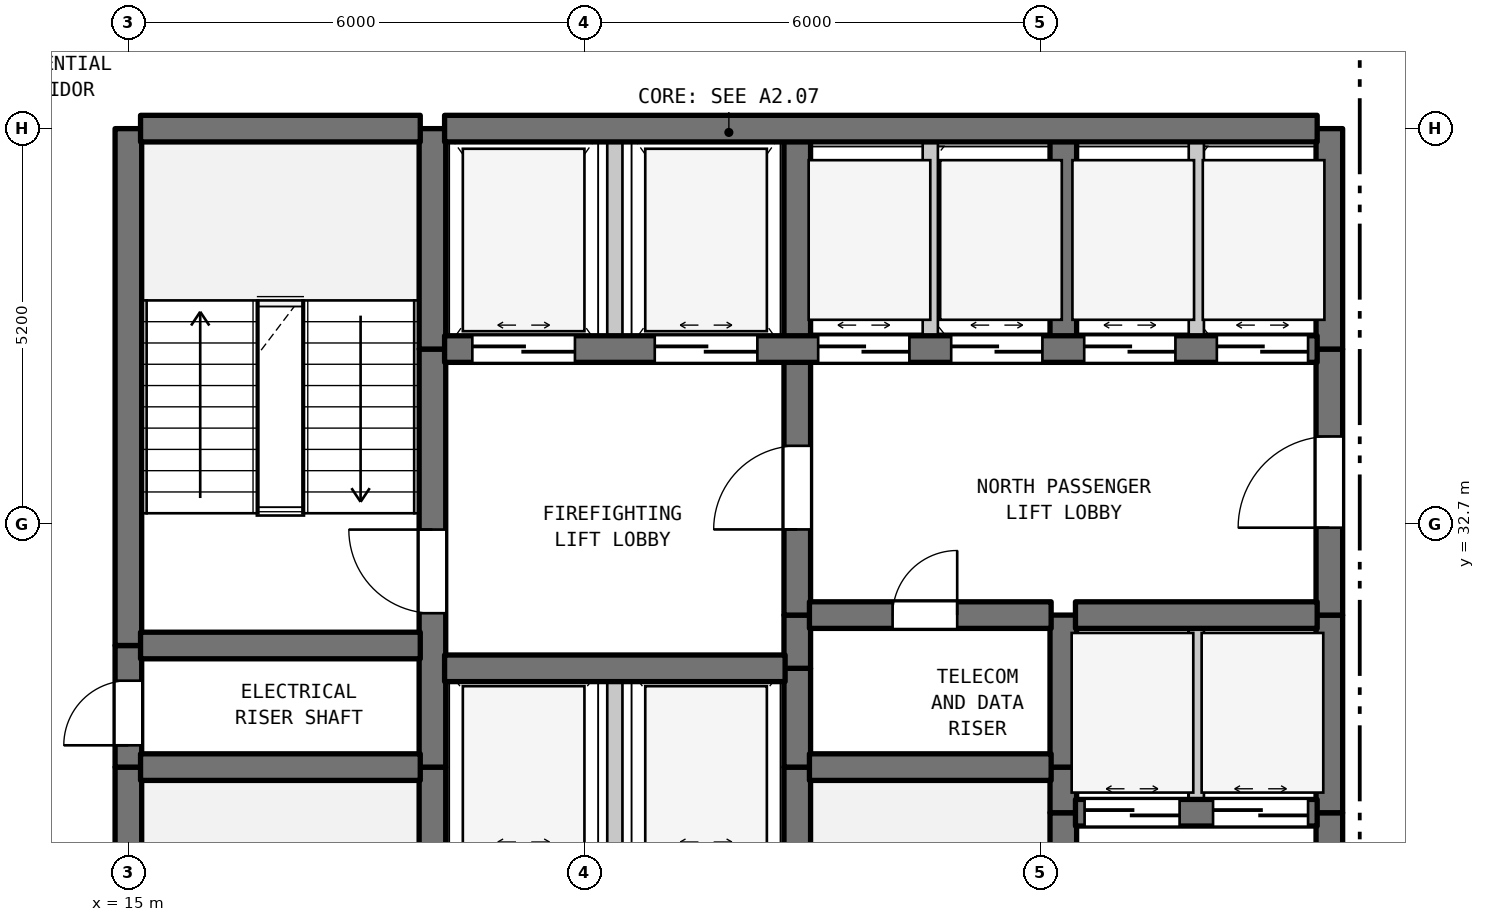
"""IFC4 building model, lengths in metres.
Left out: names, types, materials, properties, quantities, classifications, styles, units other than length and angle.
Written with IfcOpenShell. Run it as: python <this file> out.ifc"""

import sys

from ifc_helpers import new_model, si_unit, direction, frame, frame_2d, origin, place, context, subcontext, project, spatial, rectangle, extrude, element, fill, save


model = new_model("IFC4")
c1 = context("Model", 3, precision=1e-05, world=origin(), true_north=direction((0.0, 1.0)))
c2 = subcontext(c1, "Body", "Model", "MODEL_VIEW")
j1 = project(units=[si_unit("LENGTHUNIT", "METRE"), si_unit("PLANEANGLEUNIT", "RADIAN")], contexts=[c1])
p1 = place(None, origin())
s1 = spatial("IfcSite", under=j1, at=p1, CompositionType="ELEMENT")
p2 = place(p1, origin())
s2 = spatial("IfcBuilding", under=s1, at=p2, CompositionType="ELEMENT")
p3 = place(p2, frame((0.0, 0.0, 27.7)))
s3 = spatial("IfcBuildingStorey", under=s2, at=p3, CompositionType="ELEMENT", Elevation=27.7)
p4 = place(p3, frame((15.0, 22.7, 0.0), z_axis=(0.0, 0.0, 1.0), x_axis=(0.0, 1.0, 0.0)))
e1 = element("IfcWall", 1, at=p4, inside=s3, PredefinedType="SHEAR", context=c2, shape_type="SweptSolid", body=[
    extrude(rectangle(XDim=6.8, YDim=0.35, at=frame_2d((3.4, 0.0))), origin(), (0.0, 0.0, 1.0), 3.385),
])
p5 = place(p3, frame((15.0, 29.5, 0.0), z_axis=(0.0, 0.0, 1.0), x_axis=(0.0, 1.0, 0.0)))
e2 = element("IfcWall", 2, at=p5, inside=s3, PredefinedType="SHEAR", context=c2, shape_type="SweptSolid", body=[
    extrude(rectangle(XDim=1.6, YDim=0.35, at=frame_2d((0.8, 0.0))), origin(), (0.0, 0.0, 1.0), 3.385),
])
p6 = place(p5, frame((0.287, 0.0, 0.0)))
e3 = element("IfcOpeningElement", 3, at=p6, cuts=e2, PredefinedType="OPENING", context=c2, shape_type="SweptSolid", body=[
    extrude(rectangle(XDim=0.85, YDim=2.1, at=frame_2d((0.425, 1.05))), frame((0.0, 0.185, 0.0), z_axis=(0.0, -1.0, 0.0), x_axis=(1.0, 0.0, 0.0)), (0.0, 0.0, 1.0), 0.37),
])
p7 = place(p3, frame((15.0, 31.1, 0.0), z_axis=(0.0, 0.0, 1.0), x_axis=(0.0, 1.0, 0.0)))
e4 = element("IfcWall", 4, at=p7, inside=s3, PredefinedType="SHEAR", context=c2, shape_type="SweptSolid", body=[
    extrude(rectangle(XDim=6.8, YDim=0.35, at=frame_2d((3.4, 0.0))), origin(), (0.0, 0.0, 1.0), 3.385),
])
p8 = place(p3, frame((19.0, 28.2, 0.0), z_axis=(0.0, 0.0, 1.0), x_axis=(0.0, 1.0, 0.0)))
e5 = element("IfcWall", 5, at=p8, inside=s3, PredefinedType="SHEAR", context=c2, shape_type="SweptSolid", body=[
    extrude(rectangle(XDim=1.3, YDim=0.35, at=frame_2d((0.65, 0.0))), origin(), (0.0, 0.0, 1.0), 3.385),
])
p9 = place(p3, frame((19.0, 29.5, 0.0), z_axis=(0.0, 0.0, 1.0), x_axis=(0.0, 1.0, 0.0)))
e6 = element("IfcWall", 6, at=p9, inside=s3, PredefinedType="SHEAR", context=c2, shape_type="SweptSolid", body=[
    extrude(rectangle(XDim=5.5, YDim=0.35, at=frame_2d((2.75, 0.0))), origin(), (0.0, 0.0, 1.0), 3.385),
])
p10 = place(p9, frame((2.025, 0.0, 0.0)))
e7 = element("IfcOpeningElement", 7, at=p10, cuts=e6, PredefinedType="OPENING", context=c2, shape_type="SweptSolid", body=[
    extrude(rectangle(XDim=1.1, YDim=2.15, at=frame_2d((0.55, 1.075))), frame((0.0, 0.185, 0.0), z_axis=(0.0, -1.0, 0.0), x_axis=(1.0, 0.0, 0.0)), (0.0, 0.0, 1.0), 0.37),
])
p11 = place(p3, frame((19.0, 35.0, 0.0), z_axis=(0.0, 0.0, 1.0), x_axis=(0.0, 1.0, 0.0)))
e8 = element("IfcWall", 8, at=p11, inside=s3, PredefinedType="SHEAR", context=c2, shape_type="SweptSolid", body=[
    extrude(rectangle(XDim=2.9, YDim=0.35, at=frame_2d((1.45, 0.0))), origin(), (0.0, 0.0, 1.0), 3.385),
])
p12 = place(p3, frame((21.4, 28.2, 0.0), z_axis=(0.0, 0.0, 1.0), x_axis=(0.0, 1.0, 0.0)))
e9 = element("IfcWall", 9, at=p12, inside=s3, PredefinedType="STANDARD", context=c2, shape_type="SweptSolid", body=[
    extrude(rectangle(XDim=2.6, YDim=0.2, at=frame_2d((1.3, 0.0))), origin(), (0.0, 0.0, 1.0), 3.385),
])
p13 = place(p3, frame((21.4, 35.0, 0.0), z_axis=(0.0, 0.0, 1.0), x_axis=(0.0, 1.0, 0.0)))
e10 = element("IfcWall", 10, at=p13, inside=s3, PredefinedType="STANDARD", context=c2, shape_type="SweptSolid", body=[
    extrude(rectangle(XDim=2.9, YDim=0.2, at=frame_2d((1.45, 0.0))), origin(), (0.0, 0.0, 1.0), 3.385),
])
for number, where, z_axis, x_axis in (
    (11, (23.8, 28.2, 0.0), (0.0, 0.0, 1.0), (0.0, 1.0, 0.0)),
    (12, (23.8, 29.5, 0.0), (0.0, 0.0, 1.0), (0.0, 1.0, 0.0)),
):
    element("IfcWall", number, at=place(p3, frame(where, z_axis=z_axis, x_axis=x_axis)), inside=s3, PredefinedType="SHEAR", context=c2, shape_type="SweptSolid", body=[
        extrude(rectangle(XDim=1.3, YDim=0.35, at=frame_2d((0.65, 0.0))), origin(), (0.0, 0.0, 1.0), 3.385),
    ])
p14 = place(p3, frame((23.8, 30.8, 0.0), z_axis=(0.0, 0.0, 1.0), x_axis=(0.0, 1.0, 0.0)))
e13 = element("IfcWall", 13, at=p14, inside=s3, PredefinedType="SHEAR", context=c2, shape_type="SweptSolid", body=[
    extrude(rectangle(XDim=0.7, YDim=0.35, at=frame_2d((0.35, 0.0))), origin(), (0.0, 0.0, 1.0), 3.385),
])
p15 = place(p3, frame((23.8, 31.5, 0.0), z_axis=(0.0, 0.0, 1.0), x_axis=(0.0, 1.0, 0.0)))
e14 = element("IfcWall", 14, at=p15, inside=s3, PredefinedType="SHEAR", context=c2, shape_type="SweptSolid", body=[
    extrude(rectangle(XDim=3.5, YDim=0.35, at=frame_2d((1.75, 0.0))), origin(), (0.0, 0.0, 1.0), 3.385),
])
p16 = place(p15, frame((1.127, 0.0, 0.0)))
e15 = element("IfcOpeningElement", 15, at=p16, cuts=e14, PredefinedType="OPENING", context=c2, shape_type="SweptSolid", body=[
    extrude(rectangle(XDim=1.1, YDim=2.15, at=frame_2d((0.55, 1.075))), frame((0.0, 0.185, 0.0), z_axis=(0.0, -1.0, 0.0), x_axis=(1.0, 0.0, 0.0)), (0.0, 0.0, 1.0), 0.37),
])
p17 = place(p3, frame((23.8, 35.0, 0.0), z_axis=(0.0, 0.0, 1.0), x_axis=(0.0, 1.0, 0.0)))
e16 = element("IfcWall", 16, at=p17, inside=s3, PredefinedType="SHEAR", context=c2, shape_type="SweptSolid", body=[
    extrude(rectangle(XDim=2.9, YDim=0.35, at=frame_2d((1.45, 0.0))), origin(), (0.0, 0.0, 1.0), 3.385),
])
p18 = place(p3, frame((25.55, 35.0, 0.0), z_axis=(0.0, 0.0, 1.0), x_axis=(0.0, 1.0, 0.0)))
e17 = element("IfcWall", 17, at=p18, inside=s3, PredefinedType="STANDARD", context=c2, shape_type="SweptSolid", body=[
    extrude(rectangle(XDim=2.9, YDim=0.2, at=frame_2d((1.45, 0.0))), origin(), (0.0, 0.0, 1.0), 3.385),
])
p19 = place(p3, frame((27.3, 25.6, 0.0), z_axis=(0.0, 0.0, 1.0), x_axis=(0.0, 1.0, 0.0)))
e18 = element("IfcWall", 18, at=p19, inside=s3, PredefinedType="SHEAR", context=c2, shape_type="SweptSolid", body=[
    extrude(rectangle(XDim=3.3, YDim=0.35, at=frame_2d((1.65, 0.0))), origin(), (0.0, 0.0, 1.0), 3.385),
])
p20 = place(p3, frame((27.3, 28.9, 0.0), z_axis=(0.0, 0.0, 1.0), x_axis=(0.0, 1.0, 0.0)))
e19 = element("IfcWall", 19, at=p20, inside=s3, PredefinedType="SHEAR", context=c2, shape_type="SweptSolid", body=[
    extrude(rectangle(XDim=0.6, YDim=0.35, at=frame_2d((0.3, 0.0))), origin(), (0.0, 0.0, 1.0), 3.385),
])
p21 = place(p3, frame((27.3, 29.5, 0.0), z_axis=(0.0, 0.0, 1.0), x_axis=(0.0, 1.0, 0.0)))
e20 = element("IfcWall", 20, at=p21, inside=s3, PredefinedType="SHEAR", context=c2, shape_type="SweptSolid", body=[
    extrude(rectangle(XDim=2.0, YDim=0.35, at=frame_2d((1.0, 0.0))), origin(), (0.0, 0.0, 1.0), 3.385),
])
p22 = place(p3, frame((27.3, 35.0, 0.0), z_axis=(0.0, 0.0, 1.0), x_axis=(0.0, 1.0, 0.0)))
e21 = element("IfcWall", 21, at=p22, inside=s3, PredefinedType="SHEAR", context=c2, shape_type="SweptSolid", body=[
    extrude(rectangle(XDim=2.9, YDim=0.35, at=frame_2d((1.45, 0.0))), origin(), (0.0, 0.0, 1.0), 3.385),
])
p23 = place(p3, frame((29.05, 28.9, 0.0), z_axis=(0.0, 0.0, 1.0), x_axis=(0.0, 1.0, 0.0)))
e22 = element("IfcWall", 22, at=p23, inside=s3, PredefinedType="STANDARD", context=c2, shape_type="SweptSolid", body=[
    extrude(rectangle(XDim=2.6, YDim=0.2, at=frame_2d((1.3, 0.0))), origin(), (0.0, 0.0, 1.0), 3.385),
])
p24 = place(p3, frame((29.05, 35.0, 0.0), z_axis=(0.0, 0.0, 1.0), x_axis=(0.0, 1.0, 0.0)))
e23 = element("IfcWall", 23, at=p24, inside=s3, PredefinedType="STANDARD", context=c2, shape_type="SweptSolid", body=[
    extrude(rectangle(XDim=2.9, YDim=0.2, at=frame_2d((1.45, 0.0))), origin(), (0.0, 0.0, 1.0), 3.385),
])
p25 = place(p3, frame((30.8, 25.6, 0.0), z_axis=(0.0, 0.0, 1.0), x_axis=(0.0, 1.0, 0.0)))
e24 = element("IfcWall", 24, at=p25, inside=s3, PredefinedType="SHEAR", context=c2, shape_type="SweptSolid", body=[
    extrude(rectangle(XDim=3.3, YDim=0.35, at=frame_2d((1.65, 0.0))), origin(), (0.0, 0.0, 1.0), 3.385),
])
p26 = place(p25, frame((0.978, 0.0, 0.0)))
e25 = element("IfcOpeningElement", 25, at=p26, cuts=e24, PredefinedType="OPENING", context=c2, shape_type="SweptSolid", body=[
    extrude(rectangle(XDim=1.2, YDim=2.2, at=frame_2d((0.6, 1.1))), frame((0.0, 0.185, 0.0), z_axis=(0.0, -1.0, 0.0), x_axis=(1.0, 0.0, 0.0)), (0.0, 0.0, 1.0), 0.37),
])
p27 = place(p3, frame((30.8, 28.9, 0.0), z_axis=(0.0, 0.0, 1.0), x_axis=(0.0, 1.0, 0.0)))
e26 = element("IfcWall", 26, at=p27, inside=s3, PredefinedType="SHEAR", context=c2, shape_type="SweptSolid", body=[
    extrude(rectangle(XDim=2.6, YDim=0.35, at=frame_2d((1.3, 0.0))), origin(), (0.0, 0.0, 1.0), 3.385),
])
p28 = place(p3, frame((30.8, 31.5, 0.0), z_axis=(0.0, 0.0, 1.0), x_axis=(0.0, 1.0, 0.0)))
e27 = element("IfcWall", 27, at=p28, inside=s3, PredefinedType="SHEAR", context=c2, shape_type="SweptSolid", body=[
    extrude(rectangle(XDim=3.5, YDim=0.35, at=frame_2d((1.75, 0.0))), origin(), (0.0, 0.0, 1.0), 3.385),
])
p29 = place(p28, frame((1.15, 0.0, 0.0)))
e28 = element("IfcOpeningElement", 28, at=p29, cuts=e27, PredefinedType="OPENING", context=c2, shape_type="SweptSolid", body=[
    extrude(rectangle(XDim=1.2, YDim=2.2, at=frame_2d((0.6, 1.1))), frame((0.0, 0.185, 0.0), z_axis=(0.0, -1.0, 0.0), x_axis=(1.0, 0.0, 0.0)), (0.0, 0.0, 1.0), 0.37),
])
p30 = place(p3, frame((30.8, 35.0, 0.0), z_axis=(0.0, 0.0, 1.0), x_axis=(0.0, 1.0, 0.0)))
e29 = element("IfcWall", 29, at=p30, inside=s3, PredefinedType="SHEAR", context=c2, shape_type="SweptSolid", body=[
    extrude(rectangle(XDim=2.9, YDim=0.35, at=frame_2d((1.45, 0.0))), origin(), (0.0, 0.0, 1.0), 3.385),
])
p31 = place(p3, frame((27.46, 28.9, 0.0), z_axis=(0.0, 0.0, 1.0), x_axis=(1.0, 0.0, 0.0)))
e30 = element("IfcWall", 30, at=p31, inside=s3, PredefinedType="SHEAR", context=c2, shape_type="SweptSolid", body=[
    extrude(rectangle(XDim=3.18, YDim=0.35, at=frame_2d((1.59, 0.0))), origin(), (0.0, 0.0, 1.0), 3.385),
])
p32 = place(p31, frame((0.12, 0.0, 0.0)))
e31 = element("IfcOpeningElement", 31, at=p32, cuts=e30, PredefinedType="OPENING", context=c2, shape_type="SweptSolid", body=[
    extrude(rectangle(XDim=1.25, YDim=2.2, at=frame_2d((0.625, 1.1))), frame((0.0, 0.185, 0.0), z_axis=(0.0, -1.0, 0.0), x_axis=(1.0, 0.0, 0.0)), (0.0, 0.0, 1.0), 0.37),
])
p33 = place(p31, frame((1.81, 0.0, 0.0)))
e32 = element("IfcOpeningElement", 32, at=p33, cuts=e30, PredefinedType="OPENING", context=c2, shape_type="SweptSolid", body=[
    extrude(rectangle(XDim=1.25, YDim=2.2, at=frame_2d((0.625, 1.1))), frame((0.0, 0.185, 0.0), z_axis=(0.0, -1.0, 0.0), x_axis=(1.0, 0.0, 0.0)), (0.0, 0.0, 1.0), 0.37),
])
p34 = place(p3, frame((15.16, 29.5, 0.0), z_axis=(0.0, 0.0, 1.0), x_axis=(1.0, 0.0, 0.0)))
e33 = element("IfcWall", 33, at=p34, inside=s3, PredefinedType="SHEAR", context=c2, shape_type="SweptSolid", body=[
    extrude(rectangle(XDim=3.68, YDim=0.35, at=frame_2d((1.84, 0.0))), origin(), (0.0, 0.0, 1.0), 3.385),
])
p35 = place(p3, frame((23.96, 29.5, 0.0), z_axis=(0.0, 0.0, 1.0), x_axis=(1.0, 0.0, 0.0)))
e34 = element("IfcWall", 34, at=p35, inside=s3, PredefinedType="SHEAR", context=c2, shape_type="SweptSolid", body=[
    extrude(rectangle(XDim=3.18, YDim=0.35, at=frame_2d((1.59, 0.0))), origin(), (0.0, 0.0, 1.0), 3.385),
])
p36 = place(p3, frame((19.16, 30.8, 0.0), z_axis=(0.0, 0.0, 1.0), x_axis=(1.0, 0.0, 0.0)))
e35 = element("IfcWall", 35, at=p36, inside=s3, PredefinedType="SHEAR", context=c2, shape_type="SweptSolid", body=[
    extrude(rectangle(XDim=4.48, YDim=0.35, at=frame_2d((2.24, 0.0))), origin(), (0.0, 0.0, 1.0), 3.385),
])
p37 = place(p3, frame((15.16, 31.1, 0.0), z_axis=(0.0, 0.0, 1.0), x_axis=(1.0, 0.0, 0.0)))
e36 = element("IfcWall", 36, at=p37, inside=s3, PredefinedType="SHEAR", context=c2, shape_type="SweptSolid", body=[
    extrude(rectangle(XDim=3.68, YDim=0.35, at=frame_2d((1.84, 0.0))), origin(), (0.0, 0.0, 1.0), 3.385),
])
p38 = place(p3, frame((23.96, 31.5, 0.0), z_axis=(0.0, 0.0, 1.0), x_axis=(1.0, 0.0, 0.0)))
e37 = element("IfcWall", 37, at=p38, inside=s3, PredefinedType="SHEAR", context=c2, shape_type="SweptSolid", body=[
    extrude(rectangle(XDim=3.18, YDim=0.35, at=frame_2d((1.59, 0.0))), origin(), (0.0, 0.0, 1.0), 3.385),
])
p39 = place(p38, frame((1.094, 0.0, 0.0)))
e38 = element("IfcOpeningElement", 38, at=p39, cuts=e37, PredefinedType="OPENING", context=c2, shape_type="SweptSolid", body=[
    extrude(rectangle(XDim=0.85, YDim=2.1, at=frame_2d((0.425, 1.05))), frame((0.0, 0.185, 0.0), z_axis=(0.0, -1.0, 0.0), x_axis=(1.0, 0.0, 0.0)), (0.0, 0.0, 1.0), 0.37),
])
p40 = place(p3, frame((27.46, 31.5, 0.0), z_axis=(0.0, 0.0, 1.0), x_axis=(1.0, 0.0, 0.0)))
e39 = element("IfcWall", 39, at=p40, inside=s3, PredefinedType="SHEAR", context=c2, shape_type="SweptSolid", body=[
    extrude(rectangle(XDim=3.18, YDim=0.35, at=frame_2d((1.59, 0.0))), origin(), (0.0, 0.0, 1.0), 3.385),
])
p41 = place(p3, frame((19.16, 35.0, 0.0), z_axis=(0.0, 0.0, 1.0), x_axis=(1.0, 0.0, 0.0)))
e40 = element("IfcWall", 40, at=p41, inside=s3, PredefinedType="SHEAR", context=c2, shape_type="SweptSolid", body=[
    extrude(rectangle(XDim=11.48, YDim=0.35, at=frame_2d((5.74, 0.0))), origin(), (0.0, 0.0, 1.0), 3.385),
])
p42 = place(p41, frame((0.365, 0.0, 0.0)))
e41 = element("IfcOpeningElement", 41, at=p42, cuts=e40, PredefinedType="OPENING", context=c2, shape_type="SweptSolid", body=[
    extrude(rectangle(XDim=1.35, YDim=2.2, at=frame_2d((0.675, 1.1))), frame((0.0, 0.185, 0.0), z_axis=(0.0, -1.0, 0.0), x_axis=(1.0, 0.0, 0.0)), (0.0, 0.0, 1.0), 0.37),
])
p43 = place(p41, frame((2.765, 0.0, 0.0)))
e42 = element("IfcOpeningElement", 42, at=p43, cuts=e40, PredefinedType="OPENING", context=c2, shape_type="SweptSolid", body=[
    extrude(rectangle(XDim=1.35, YDim=2.2, at=frame_2d((0.675, 1.1))), frame((0.0, 0.185, 0.0), z_axis=(0.0, -1.0, 0.0), x_axis=(1.0, 0.0, 0.0)), (0.0, 0.0, 1.0), 0.37),
])
p44 = place(p41, frame((4.915, 0.0, 0.0)))
e43 = element("IfcOpeningElement", 43, at=p44, cuts=e40, PredefinedType="OPENING", context=c2, shape_type="SweptSolid", body=[
    extrude(rectangle(XDim=1.2, YDim=2.2, at=frame_2d((0.6, 1.1))), frame((0.0, 0.185, 0.0), z_axis=(0.0, -1.0, 0.0), x_axis=(1.0, 0.0, 0.0)), (0.0, 0.0, 1.0), 0.37),
])
p45 = place(p41, frame((6.665, 0.0, 0.0)))
e44 = element("IfcOpeningElement", 44, at=p45, cuts=e40, PredefinedType="OPENING", context=c2, shape_type="SweptSolid", body=[
    extrude(rectangle(XDim=1.2, YDim=2.2, at=frame_2d((0.6, 1.1))), frame((0.0, 0.185, 0.0), z_axis=(0.0, -1.0, 0.0), x_axis=(1.0, 0.0, 0.0)), (0.0, 0.0, 1.0), 0.37),
])
p46 = place(p41, frame((8.415, 0.0, 0.0)))
e45 = element("IfcOpeningElement", 45, at=p46, cuts=e40, PredefinedType="OPENING", context=c2, shape_type="SweptSolid", body=[
    extrude(rectangle(XDim=1.2, YDim=2.2, at=frame_2d((0.6, 1.1))), frame((0.0, 0.185, 0.0), z_axis=(0.0, -1.0, 0.0), x_axis=(1.0, 0.0, 0.0)), (0.0, 0.0, 1.0), 0.37),
])
p47 = place(p41, frame((10.16, 0.0, 0.0)))
e46 = element("IfcOpeningElement", 46, at=p47, cuts=e40, PredefinedType="OPENING", context=c2, shape_type="SweptSolid", body=[
    extrude(rectangle(XDim=1.2, YDim=2.2, at=frame_2d((0.6, 1.1))), frame((0.0, 0.185, 0.0), z_axis=(0.0, -1.0, 0.0), x_axis=(1.0, 0.0, 0.0)), (0.0, 0.0, 1.0), 0.37),
])
p48 = place(p3, frame((15.16, 37.9, 0.0), z_axis=(0.0, 0.0, 1.0), x_axis=(1.0, 0.0, 0.0)))
e47 = element("IfcWall", 47, at=p48, inside=s3, PredefinedType="SHEAR", context=c2, shape_type="SweptSolid", body=[
    extrude(rectangle(XDim=3.68, YDim=0.35, at=frame_2d((1.84, 0.0))), origin(), (0.0, 0.0, 1.0), 3.385),
])
p49 = place(p3, frame((19.16, 37.9, 0.0), z_axis=(0.0, 0.0, 1.0), x_axis=(1.0, 0.0, 0.0)))
e48 = element("IfcWall", 48, at=p49, inside=s3, PredefinedType="SHEAR", context=c2, shape_type="SweptSolid", body=[
    extrude(rectangle(XDim=11.48, YDim=0.35, at=frame_2d((5.74, 0.0))), origin(), (0.0, 0.0, 1.0), 3.385),
])
p50 = place(p6, origin())
e49 = element("IfcDoor", 49, at=p50, inside=s3, OperationType="SINGLE_SWING_LEFT", PredefinedType="DOOR", context=c2, shape_type="SweptSolid", body=[
    extrude(rectangle(XDim=0.85, YDim=2.1, at=frame_2d((0.425, 1.05))), frame((0.0, 0.025, 0.0), z_axis=(0.0, -1.0, 0.0), x_axis=(1.0, 0.0, 0.0)), (0.0, 0.0, 1.0), 0.05),
])
fill(e3, e49)
p51 = place(p10, origin())
e50 = element("IfcDoor", 50, at=p51, inside=s3, OperationType="SINGLE_SWING_RIGHT", PredefinedType="DOOR", context=c2, shape_type="SweptSolid", body=[
    extrude(rectangle(XDim=1.1, YDim=2.15, at=frame_2d((0.55, 1.075))), frame((0.0, 0.025, 0.0), z_axis=(0.0, -1.0, 0.0), x_axis=(1.0, 0.0, 0.0)), (0.0, 0.0, 1.0), 0.05),
])
fill(e7, e50)
p52 = place(p16, origin())
e51 = element("IfcDoor", 51, at=p52, inside=s3, OperationType="SINGLE_SWING_LEFT", PredefinedType="DOOR", context=c2, shape_type="SweptSolid", body=[
    extrude(rectangle(XDim=1.1, YDim=2.15, at=frame_2d((0.55, 1.075))), frame((0.0, 0.025, 0.0), z_axis=(0.0, -1.0, 0.0), x_axis=(1.0, 0.0, 0.0)), (0.0, 0.0, 1.0), 0.05),
])
fill(e15, e51)
p53 = place(p29, origin())
e52 = element("IfcDoor", 52, at=p53, inside=s3, OperationType="SINGLE_SWING_LEFT", PredefinedType="DOOR", context=c2, shape_type="SweptSolid", body=[
    extrude(rectangle(XDim=1.2, YDim=2.2, at=frame_2d((0.6, 1.1))), frame((0.0, 0.025, 0.0), z_axis=(0.0, -1.0, 0.0), x_axis=(1.0, 0.0, 0.0)), (0.0, 0.0, 1.0), 0.05),
])
fill(e28, e52)
p54 = place(p32, origin())
e53 = element("IfcDoor", 53, at=p54, inside=s3, OperationType="DOUBLE_DOOR_SLIDING", PredefinedType="DOOR", context=c2, shape_type="SweptSolid", body=[
    extrude(rectangle(XDim=1.25, YDim=2.2, at=frame_2d((0.625, 1.1))), frame((0.0, 0.025, 0.0), z_axis=(0.0, -1.0, 0.0), x_axis=(1.0, 0.0, 0.0)), (0.0, 0.0, 1.0), 0.05),
])
fill(e31, e53)
p55 = place(p33, origin())
e54 = element("IfcDoor", 54, at=p55, inside=s3, OperationType="DOUBLE_DOOR_SLIDING", PredefinedType="DOOR", context=c2, shape_type="SweptSolid", body=[
    extrude(rectangle(XDim=1.25, YDim=2.2, at=frame_2d((0.625, 1.1))), frame((0.0, 0.025, 0.0), z_axis=(0.0, -1.0, 0.0), x_axis=(1.0, 0.0, 0.0)), (0.0, 0.0, 1.0), 0.05),
])
fill(e32, e54)
p56 = place(p39, origin())
e55 = element("IfcDoor", 55, at=p56, inside=s3, OperationType="SINGLE_SWING_RIGHT", PredefinedType="DOOR", context=c2, shape_type="SweptSolid", body=[
    extrude(rectangle(XDim=0.85, YDim=2.1, at=frame_2d((0.425, 1.05))), frame((0.0, 0.025, 0.0), z_axis=(0.0, -1.0, 0.0), x_axis=(1.0, 0.0, 0.0)), (0.0, 0.0, 1.0), 0.05),
])
fill(e38, e55)
p57 = place(p42, origin())
e56 = element("IfcDoor", 56, at=p57, inside=s3, OperationType="DOUBLE_DOOR_SLIDING", PredefinedType="DOOR", context=c2, shape_type="SweptSolid", body=[
    extrude(rectangle(XDim=1.35, YDim=2.2, at=frame_2d((0.675, 1.1))), frame((0.0, 0.025, 0.0), z_axis=(0.0, -1.0, 0.0), x_axis=(1.0, 0.0, 0.0)), (0.0, 0.0, 1.0), 0.05),
])
fill(e41, e56)
p58 = place(p43, origin())
e57 = element("IfcDoor", 57, at=p58, inside=s3, OperationType="DOUBLE_DOOR_SLIDING", PredefinedType="DOOR", context=c2, shape_type="SweptSolid", body=[
    extrude(rectangle(XDim=1.35, YDim=2.2, at=frame_2d((0.675, 1.1))), frame((0.0, 0.025, 0.0), z_axis=(0.0, -1.0, 0.0), x_axis=(1.0, 0.0, 0.0)), (0.0, 0.0, 1.0), 0.05),
])
fill(e42, e57)
p59 = place(p44, origin())
e58 = element("IfcDoor", 58, at=p59, inside=s3, OperationType="DOUBLE_DOOR_SLIDING", PredefinedType="DOOR", context=c2, shape_type="SweptSolid", body=[
    extrude(rectangle(XDim=1.2, YDim=2.2, at=frame_2d((0.6, 1.1))), frame((0.0, 0.025, 0.0), z_axis=(0.0, -1.0, 0.0), x_axis=(1.0, 0.0, 0.0)), (0.0, 0.0, 1.0), 0.05),
])
fill(e43, e58)
p60 = place(p45, origin())
e59 = element("IfcDoor", 59, at=p60, inside=s3, OperationType="DOUBLE_DOOR_SLIDING", PredefinedType="DOOR", context=c2, shape_type="SweptSolid", body=[
    extrude(rectangle(XDim=1.2, YDim=2.2, at=frame_2d((0.6, 1.1))), frame((0.0, 0.025, 0.0), z_axis=(0.0, -1.0, 0.0), x_axis=(1.0, 0.0, 0.0)), (0.0, 0.0, 1.0), 0.05),
])
fill(e44, e59)
p61 = place(p46, origin())
e60 = element("IfcDoor", 60, at=p61, inside=s3, OperationType="DOUBLE_DOOR_SLIDING", PredefinedType="DOOR", context=c2, shape_type="SweptSolid", body=[
    extrude(rectangle(XDim=1.2, YDim=2.2, at=frame_2d((0.6, 1.1))), frame((0.0, 0.025, 0.0), z_axis=(0.0, -1.0, 0.0), x_axis=(1.0, 0.0, 0.0)), (0.0, 0.0, 1.0), 0.05),
])
fill(e45, e60)
p62 = place(p47, origin())
e61 = element("IfcDoor", 61, at=p62, inside=s3, OperationType="DOUBLE_DOOR_SLIDING", PredefinedType="DOOR", context=c2, shape_type="SweptSolid", body=[
    extrude(rectangle(XDim=1.2, YDim=2.2, at=frame_2d((0.6, 1.1))), frame((0.0, 0.025, 0.0), z_axis=(0.0, -1.0, 0.0), x_axis=(1.0, 0.0, 0.0)), (0.0, 0.0, 1.0), 0.05),
])
fill(e46, e61)
save(model, sys.argv[1])
